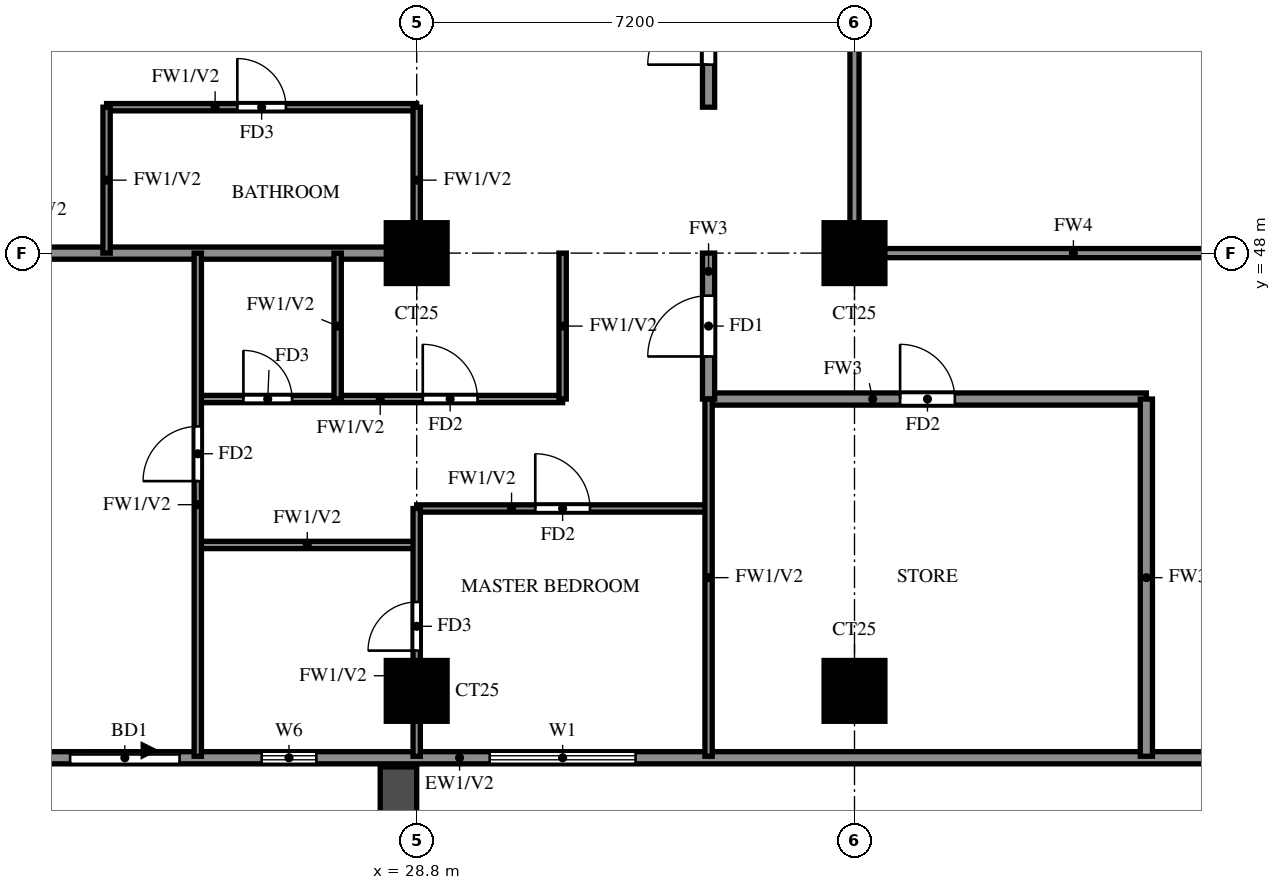
"""IFC4 building model, lengths in metres.
Left out: names, types, materials, properties, quantities, classifications, styles, units other than length and angle.
Written with IfcOpenShell. Run it as: python <this file> out.ifc"""

import sys

from ifc_helpers import new_model, si_unit, direction, frame, frame_2d, origin, origin_2d, place, context, subcontext, project, spatial, rectangle, extrude, source, transform, mapped, element, fill, save


model = new_model("IFC4")
c1 = context("Model", 3, precision=1e-05, world=origin(), true_north=direction((0.0, 1.0)))
c2 = subcontext(c1, "Body", "Model", "MODEL_VIEW")
j1 = project(units=[si_unit("LENGTHUNIT", "METRE"), si_unit("PLANEANGLEUNIT", "RADIAN")], contexts=[c1])
p1 = place(None, origin())
s1 = spatial("IfcSite", under=j1, at=p1, CompositionType="ELEMENT")
p2 = place(p1, origin())
s2 = spatial("IfcBuilding", under=s1, at=p2, CompositionType="ELEMENT")
p3 = place(p2, frame((0.0, 0.0, 160.5)))
s3 = spatial("IfcBuildingStorey", under=s2, at=p3, CompositionType="ELEMENT", Elevation=160.5)
m1 = source(origin(), c2, "Body", "SweptSolid", [
    extrude(rectangle(XDim=1.0, YDim=1.0, at=origin_2d()), origin(), (0.0, 0.0, 1.0), 3.2),
])
for number, where, z_axis, x_axis in (
    (1, (28.8, 40.8, 0.0), (0.0, 0.0, 1.0), (1.0, 0.0, 0.0)),
    (2, (36.0, 40.8, 0.0), (0.0, 0.0, 1.0), (1.0, 0.0, 0.0)),
    (3, (28.8, 48.0, 0.0), (0.0, 0.0, 1.0), (1.0, 0.0, 0.0)),
    (4, (36.0, 48.0, 0.0), (0.0, 0.0, 1.0), (1.0, 0.0, 0.0)),
):
    element("IfcColumn", number, at=place(p3, frame(where, z_axis=z_axis, x_axis=x_axis)), inside=s3, PredefinedType="COLUMN", context=c2, shape_type="MappedRepresentation", body=[
        mapped(m1, transform((0.0, 0.0, 0.0))),
    ])
p4 = place(p3, frame((18.2, 39.7, 0.0), z_axis=(0.0, 0.0, 1.0), x_axis=(1.0, 0.0, 0.0)))
e5 = element("IfcWall", 5, at=p4, inside=s3, PredefinedType="SOLIDWALL", context=c2, shape_type="SweptSolid", body=[
    extrude(rectangle(XDim=23.8, YDim=0.2, at=frame_2d((11.9, 0.0))), origin(), (0.0, 0.0, 1.0), 3.2),
])
p5 = place(p4, frame((4.9, 0.0, 0.0)))
e6 = element("IfcOpeningElement", 6, at=p5, cuts=e5, PredefinedType="OPENING", context=c2, shape_type="SweptSolid", body=[
    extrude(rectangle(XDim=1.8, YDim=2.4, at=frame_2d((0.9, 1.2))), frame((0.0, 0.11, 0.0), z_axis=(0.0, -1.0, 0.0), x_axis=(1.0, 0.0, 0.0)), (0.0, 0.0, 1.0), 0.22),
])
p6 = place(p4, frame((0.6, 0.0, 0.6)))
e7 = element("IfcOpeningElement", 7, at=p6, cuts=e5, PredefinedType="OPENING", context=c2, shape_type="SweptSolid", body=[
    extrude(rectangle(XDim=2.4, YDim=2.4, at=frame_2d((1.2, 1.2))), frame((0.0, 0.11, 0.0), z_axis=(0.0, -1.0, 0.0), x_axis=(1.0, 0.0, 0.0)), (0.0, 0.0, 1.0), 0.22),
])
p7 = place(p4, frame((11.8, 0.0, 0.6)))
e8 = element("IfcOpeningElement", 8, at=p7, cuts=e5, PredefinedType="OPENING", context=c2, shape_type="SweptSolid", body=[
    extrude(rectangle(XDim=2.4, YDim=2.4, at=frame_2d((1.2, 1.2))), frame((0.0, 0.11, 0.0), z_axis=(0.0, -1.0, 0.0), x_axis=(1.0, 0.0, 0.0)), (0.0, 0.0, 1.0), 0.22),
])
p8 = place(p4, frame((8.05, 0.0, 1.5)))
e9 = element("IfcOpeningElement", 9, at=p8, cuts=e5, PredefinedType="OPENING", context=c2, shape_type="SweptSolid", body=[
    extrude(rectangle(XDim=0.9, YDim=0.9, at=frame_2d((0.45, 0.45))), frame((0.0, 0.11, 0.0), z_axis=(0.0, -1.0, 0.0), x_axis=(1.0, 0.0, 0.0)), (0.0, 0.0, 1.0), 0.22),
])
p9 = place(p3, frame((28.5, 39.55, 0.0), z_axis=(0.0, 0.0, 1.0), x_axis=(0.0, -1.0, 0.0)))
e10 = element("IfcWall", 10, at=p9, inside=s3, PredefinedType="SOLIDWALL", context=c2, shape_type="SweptSolid", body=[
    extrude(rectangle(XDim=2.65, YDim=0.6, at=frame_2d((1.325, 0.0))), origin(), (0.0, 0.0, 1.0), 2.85),
])
p10 = place(p3, frame((33.6, 45.6, 0.0), z_axis=(0.0, 0.0, 1.0), x_axis=(1.0, 0.0, 0.0)))
e11 = element("IfcWall", 11, at=p10, inside=s3, PredefinedType="SOLIDWALL", context=c2, shape_type="SweptSolid", body=[
    extrude(rectangle(XDim=7.2, YDim=0.2, at=frame_2d((3.6, 0.0))), origin(), (0.0, 0.0, 1.0), 3.2),
])
p11 = place(p10, frame((3.15, 0.0, 0.0)))
e12 = element("IfcOpeningElement", 12, at=p11, cuts=e11, PredefinedType="OPENING", context=c2, shape_type="SweptSolid", body=[
    extrude(rectangle(XDim=0.9, YDim=2.1, at=frame_2d((0.45, 1.05))), frame((0.0, 0.11, 0.0), z_axis=(0.0, -1.0, 0.0), x_axis=(1.0, 0.0, 0.0)), (0.0, 0.0, 1.0), 0.22),
])
p12 = place(p3, frame((33.6, 45.6, 0.0), z_axis=(0.0, 0.0, 1.0), x_axis=(0.0, 1.0, 0.0)))
e13 = element("IfcWall", 13, at=p12, inside=s3, PredefinedType="SOLIDWALL", context=c2, shape_type="SweptSolid", body=[
    extrude(rectangle(XDim=2.4, YDim=0.2, at=frame_2d((1.2, 0.0))), origin(), (0.0, 0.0, 1.0), 3.2),
])
p13 = place(p12, frame((0.7, 0.0, 0.0)))
e14 = element("IfcOpeningElement", 14, at=p13, cuts=e13, PredefinedType="OPENING", context=c2, shape_type="SweptSolid", body=[
    extrude(rectangle(XDim=1.0, YDim=2.1, at=frame_2d((0.5, 1.05))), frame((0.0, 0.11, 0.0), z_axis=(0.0, -1.0, 0.0), x_axis=(1.0, 0.0, 0.0)), (0.0, 0.0, 1.0), 0.22),
])
p14 = place(p3, frame((33.6, 50.4, 0.0), z_axis=(0.0, 0.0, 1.0), x_axis=(0.0, 1.0, 0.0)))
e15 = element("IfcWall", 15, at=p14, inside=s3, PredefinedType="SOLIDWALL", context=c2, shape_type="SweptSolid", body=[
    extrude(rectangle(XDim=12.0, YDim=0.2, at=frame_2d((6.0, 0.0))), origin(), (0.0, 0.0, 1.0), 3.2),
])
p15 = place(p14, frame((0.7, 0.0, 0.0)))
e16 = element("IfcOpeningElement", 16, at=p15, cuts=e15, PredefinedType="OPENING", context=c2, shape_type="SweptSolid", body=[
    extrude(rectangle(XDim=1.0, YDim=2.1, at=frame_2d((0.5, 1.05))), frame((0.0, 0.11, 0.0), z_axis=(0.0, -1.0, 0.0), x_axis=(1.0, 0.0, 0.0)), (0.0, 0.0, 1.0), 0.22),
])
p16 = place(p14, frame((9.7, 0.0, 0.0)))
e17 = element("IfcOpeningElement", 17, at=p16, cuts=e15, PredefinedType="OPENING", context=c2, shape_type="SweptSolid", body=[
    extrude(rectangle(XDim=1.0, YDim=2.1, at=frame_2d((0.5, 1.05))), frame((0.0, 0.11, 0.0), z_axis=(0.0, -1.0, 0.0), x_axis=(1.0, 0.0, 0.0)), (0.0, 0.0, 1.0), 0.22),
])
p17 = place(p3, frame((40.8, 39.725, 0.0), z_axis=(0.0, 0.0, 1.0), x_axis=(0.0, 1.0, 0.0)))
e18 = element("IfcWall", 18, at=p17, inside=s3, PredefinedType="SOLIDWALL", context=c2, shape_type="SweptSolid", body=[
    extrude(rectangle(XDim=5.875, YDim=0.2, at=frame_2d((2.938, 0.0))), origin(), (0.0, 0.0, 1.0), 3.2),
])
p18 = place(p3, frame((14.525, 48.0, 0.0), z_axis=(0.0, 0.0, 1.0), x_axis=(1.0, 0.0, 0.0)))
e19 = element("IfcWall", 19, at=p18, inside=s3, PredefinedType="SOLIDWALL", context=c2, shape_type="SweptSolid", body=[
    extrude(rectangle(XDim=14.275, YDim=0.2, at=frame_2d((7.138, 0.0))), origin(), (0.0, 0.0, 1.0), 3.2),
])
p19 = place(p3, frame((25.2, 43.2, 0.0), z_axis=(0.0, 0.0, 1.0), x_axis=(1.0, 0.0, 0.0)))
e20 = element("IfcWall", 20, at=p19, inside=s3, PredefinedType="PARTITIONING", context=c2, shape_type="SweptSolid", body=[
    extrude(rectangle(XDim=3.6, YDim=0.12, at=frame_2d((1.8, 0.0))), origin(), (0.0, 0.0, 1.0), 3.2),
])
p20 = place(p3, frame((28.8, 43.8, 0.0), z_axis=(0.0, 0.0, 1.0), x_axis=(1.0, 0.0, 0.0)))
e21 = element("IfcWall", 21, at=p20, inside=s3, PredefinedType="PARTITIONING", context=c2, shape_type="SweptSolid", body=[
    extrude(rectangle(XDim=4.8, YDim=0.12, at=frame_2d((2.4, 0.0))), origin(), (0.0, 0.0, 1.0), 3.2),
])
p21 = place(p20, frame((1.95, 0.0, 0.0)))
e22 = element("IfcOpeningElement", 22, at=p21, cuts=e21, PredefinedType="OPENING", context=c2, shape_type="SweptSolid", body=[
    extrude(rectangle(XDim=0.9, YDim=2.1, at=frame_2d((0.45, 1.05))), frame((0.0, 0.07, 0.0), z_axis=(0.0, -1.0, 0.0), x_axis=(1.0, 0.0, 0.0)), (0.0, 0.0, 1.0), 0.14),
])
p22 = place(p3, frame((25.2, 45.6, 0.0), z_axis=(0.0, 0.0, 1.0), x_axis=(1.0, 0.0, 0.0)))
e23 = element("IfcWall", 23, at=p22, inside=s3, PredefinedType="PARTITIONING", context=c2, shape_type="SweptSolid", body=[
    extrude(rectangle(XDim=6.0, YDim=0.12, at=frame_2d((3.0, 0.0))), origin(), (0.0, 0.0, 1.0), 3.2),
])
p23 = place(p22, frame((0.75, 0.0, 0.0)))
e24 = element("IfcOpeningElement", 24, at=p23, cuts=e23, PredefinedType="OPENING", context=c2, shape_type="SweptSolid", body=[
    extrude(rectangle(XDim=0.8, YDim=2.1, at=frame_2d((0.4, 1.05))), frame((0.0, 0.07, 0.0), z_axis=(0.0, -1.0, 0.0), x_axis=(1.0, 0.0, 0.0)), (0.0, 0.0, 1.0), 0.14),
])
p24 = place(p22, frame((3.7, 0.0, 0.0)))
e25 = element("IfcOpeningElement", 25, at=p24, cuts=e23, PredefinedType="OPENING", context=c2, shape_type="SweptSolid", body=[
    extrude(rectangle(XDim=0.9, YDim=2.1, at=frame_2d((0.45, 1.05))), frame((0.0, 0.07, 0.0), z_axis=(0.0, -1.0, 0.0), x_axis=(1.0, 0.0, 0.0)), (0.0, 0.0, 1.0), 0.14),
])
p25 = place(p3, frame((23.7, 50.4, 0.0), z_axis=(0.0, 0.0, 1.0), x_axis=(1.0, 0.0, 0.0)))
e26 = element("IfcWall", 26, at=p25, inside=s3, PredefinedType="PARTITIONING", context=c2, shape_type="SweptSolid", body=[
    extrude(rectangle(XDim=5.1, YDim=0.12, at=frame_2d((2.55, 0.0))), origin(), (0.0, 0.0, 1.0), 3.2),
])
p26 = place(p25, frame((2.15, 0.0, 0.0)))
e27 = element("IfcOpeningElement", 27, at=p26, cuts=e26, PredefinedType="OPENING", context=c2, shape_type="SweptSolid", body=[
    extrude(rectangle(XDim=0.8, YDim=2.1, at=frame_2d((0.4, 1.05))), frame((0.0, 0.07, 0.0), z_axis=(0.0, -1.0, 0.0), x_axis=(1.0, 0.0, 0.0)), (0.0, 0.0, 1.0), 0.14),
])
p27 = place(p3, frame((23.7, 48.0, 0.0), z_axis=(0.0, 0.0, 1.0), x_axis=(0.0, 1.0, 0.0)))
e28 = element("IfcWall", 28, at=p27, inside=s3, PredefinedType="PARTITIONING", context=c2, shape_type="SweptSolid", body=[
    extrude(rectangle(XDim=2.4, YDim=0.12, at=frame_2d((1.2, 0.0))), origin(), (0.0, 0.0, 1.0), 3.2),
])
p28 = place(p3, frame((25.2, 39.725, 0.0), z_axis=(0.0, 0.0, 1.0), x_axis=(0.0, 1.0, 0.0)))
e29 = element("IfcWall", 29, at=p28, inside=s3, PredefinedType="PARTITIONING", context=c2, shape_type="SweptSolid", body=[
    extrude(rectangle(XDim=8.275, YDim=0.12, at=frame_2d((4.137, 0.0))), origin(), (0.0, 0.0, 1.0), 3.2),
])
p29 = place(p28, frame((4.525, 0.0, 0.0)))
e30 = element("IfcOpeningElement", 30, at=p29, cuts=e29, PredefinedType="OPENING", context=c2, shape_type="SweptSolid", body=[
    extrude(rectangle(XDim=0.9, YDim=2.1, at=frame_2d((0.45, 1.05))), frame((0.0, 0.07, 0.0), z_axis=(0.0, -1.0, 0.0), x_axis=(1.0, 0.0, 0.0)), (0.0, 0.0, 1.0), 0.14),
])
p30 = place(p3, frame((27.5, 45.6, 0.0), z_axis=(0.0, 0.0, 1.0), x_axis=(0.0, 1.0, 0.0)))
e31 = element("IfcWall", 31, at=p30, inside=s3, PredefinedType="PARTITIONING", context=c2, shape_type="SweptSolid", body=[
    extrude(rectangle(XDim=2.4, YDim=0.12, at=frame_2d((1.2, 0.0))), origin(), (0.0, 0.0, 1.0), 3.2),
])
p31 = place(p3, frame((28.8, 39.725, 0.0), z_axis=(0.0, 0.0, 1.0), x_axis=(0.0, 1.0, 0.0)))
e32 = element("IfcWall", 32, at=p31, inside=s3, PredefinedType="PARTITIONING", context=c2, shape_type="SweptSolid", body=[
    extrude(rectangle(XDim=4.075, YDim=0.12, at=frame_2d((2.038, 0.0))), origin(), (0.0, 0.0, 1.0), 3.2),
])
p32 = place(p31, frame((1.738, 0.0, 0.0)))
e33 = element("IfcOpeningElement", 33, at=p32, cuts=e32, PredefinedType="OPENING", context=c2, shape_type="SweptSolid", body=[
    extrude(rectangle(XDim=0.8, YDim=2.1, at=frame_2d((0.4, 1.05))), frame((0.0, 0.07, 0.0), z_axis=(0.0, -1.0, 0.0), x_axis=(1.0, 0.0, 0.0)), (0.0, 0.0, 1.0), 0.14),
])
for number, where, z_axis, x_axis in (
    (34, (28.8, 48.0, 0.0), (0.0, 0.0, 1.0), (0.0, 1.0, 0.0)),
    (35, (31.2, 45.6, 0.0), (0.0, 0.0, 1.0), (0.0, 1.0, 0.0)),
):
    element("IfcWall", number, at=place(p3, frame(where, z_axis=z_axis, x_axis=x_axis)), inside=s3, PredefinedType="PARTITIONING", context=c2, shape_type="SweptSolid", body=[
        extrude(rectangle(XDim=2.4, YDim=0.12, at=frame_2d((1.2, 0.0))), origin(), (0.0, 0.0, 1.0), 3.2),
    ])
p33 = place(p3, frame((33.6, 39.725, 0.0), z_axis=(0.0, 0.0, 1.0), x_axis=(0.0, 1.0, 0.0)))
e36 = element("IfcWall", 36, at=p33, inside=s3, PredefinedType="PARTITIONING", context=c2, shape_type="SweptSolid", body=[
    extrude(rectangle(XDim=5.875, YDim=0.12, at=frame_2d((2.938, 0.0))), origin(), (0.0, 0.0, 1.0), 3.2),
])
p34 = place(p3, frame((36.0, 48.0, 0.0), z_axis=(0.0, 0.0, 1.0), x_axis=(1.0, 0.0, 0.0)))
e37 = element("IfcWall", 37, at=p34, inside=s3, PredefinedType="SOLIDWALL", context=c2, shape_type="SweptSolid", body=[
    extrude(rectangle(XDim=7.2, YDim=0.15, at=frame_2d((3.6, 0.0))), origin(), (0.0, 0.0, 1.0), 2.3),
])
p35 = place(p3, frame((36.0, 48.0, 0.0), z_axis=(0.0, 0.0, 1.0), x_axis=(0.0, 1.0, 0.0)))
e38 = element("IfcWall", 38, at=p35, inside=s3, PredefinedType="SOLIDWALL", context=c2, shape_type="SweptSolid", body=[
    extrude(rectangle(XDim=14.4, YDim=0.15, at=frame_2d((7.2, 0.0))), origin(), (0.0, 0.0, 1.0), 2.3),
])
p36 = place(p5, origin())
e39 = element("IfcDoor", 39, at=p36, inside=s3, OperationType="DOUBLE_DOOR_SLIDING", PredefinedType="DOOR", context=c2, shape_type="SweptSolid", body=[
    extrude(rectangle(XDim=1.8, YDim=2.4, at=frame_2d((0.9, 1.2))), frame((0.0, 0.025, 0.0), z_axis=(0.0, -1.0, 0.0), x_axis=(1.0, 0.0, 0.0)), (0.0, 0.0, 1.0), 0.05),
])
fill(e6, e39)
p37 = place(p7, origin())
e40 = element("IfcWindow", 40, at=p37, inside=s3, PartitioningType="DOUBLE_PANEL_VERTICAL", PredefinedType="WINDOW", context=c2, shape_type="SweptSolid", body=[
    extrude(rectangle(XDim=2.4, YDim=2.4, at=frame_2d((1.2, 1.2))), frame((0.0, 0.03, 0.0), z_axis=(0.0, -1.0, 0.0), x_axis=(1.0, 0.0, 0.0)), (0.0, 0.0, 1.0), 0.06),
])
fill(e8, e40)
p38 = place(p8, origin())
e41 = element("IfcWindow", 41, at=p38, inside=s3, PartitioningType="SINGLE_PANEL", PredefinedType="WINDOW", context=c2, shape_type="SweptSolid", body=[
    extrude(rectangle(XDim=0.9, YDim=0.9, at=frame_2d((0.45, 0.45))), frame((0.0, 0.03, 0.0), z_axis=(0.0, -1.0, 0.0), x_axis=(1.0, 0.0, 0.0)), (0.0, 0.0, 1.0), 0.06),
])
fill(e9, e41)
p39 = place(p13, origin())
e42 = element("IfcDoor", 42, at=p39, inside=s3, OperationType="SINGLE_SWING_RIGHT", PredefinedType="DOOR", context=c2, shape_type="SweptSolid", body=[
    extrude(rectangle(XDim=1.0, YDim=2.1, at=frame_2d((0.5, 1.05))), frame((0.0, 0.025, 0.0), z_axis=(0.0, -1.0, 0.0), x_axis=(1.0, 0.0, 0.0)), (0.0, 0.0, 1.0), 0.05),
])
fill(e14, e42)
p40 = place(p29, origin())
e43 = element("IfcDoor", 43, at=p40, inside=s3, OperationType="SINGLE_SWING_LEFT", PredefinedType="DOOR", context=c2, shape_type="SweptSolid", body=[
    extrude(rectangle(XDim=0.9, YDim=2.1, at=frame_2d((0.45, 1.05))), frame((0.0, 0.025, 0.0), z_axis=(0.0, -1.0, 0.0), x_axis=(1.0, 0.0, 0.0)), (0.0, 0.0, 1.0), 0.05),
])
fill(e30, e43)
p41 = place(p21, origin())
e44 = element("IfcDoor", 44, at=p41, inside=s3, OperationType="SINGLE_SWING_LEFT", PredefinedType="DOOR", context=c2, shape_type="SweptSolid", body=[
    extrude(rectangle(XDim=0.9, YDim=2.1, at=frame_2d((0.45, 1.05))), frame((0.0, 0.025, 0.0), z_axis=(0.0, -1.0, 0.0), x_axis=(1.0, 0.0, 0.0)), (0.0, 0.0, 1.0), 0.05),
])
fill(e22, e44)
p42 = place(p32, origin())
e45 = element("IfcDoor", 45, at=p42, inside=s3, OperationType="SINGLE_SWING_LEFT", PredefinedType="DOOR", context=c2, shape_type="SweptSolid", body=[
    extrude(rectangle(XDim=0.8, YDim=2.1, at=frame_2d((0.4, 1.05))), frame((0.0, 0.025, 0.0), z_axis=(0.0, -1.0, 0.0), x_axis=(1.0, 0.0, 0.0)), (0.0, 0.0, 1.0), 0.05),
])
fill(e33, e45)
p43 = place(p23, origin())
e46 = element("IfcDoor", 46, at=p43, inside=s3, OperationType="SINGLE_SWING_LEFT", PredefinedType="DOOR", context=c2, shape_type="SweptSolid", body=[
    extrude(rectangle(XDim=0.8, YDim=2.1, at=frame_2d((0.4, 1.05))), frame((0.0, 0.025, 0.0), z_axis=(0.0, -1.0, 0.0), x_axis=(1.0, 0.0, 0.0)), (0.0, 0.0, 1.0), 0.05),
])
fill(e24, e46)
p44 = place(p24, origin())
e47 = element("IfcDoor", 47, at=p44, inside=s3, OperationType="SINGLE_SWING_LEFT", PredefinedType="DOOR", context=c2, shape_type="SweptSolid", body=[
    extrude(rectangle(XDim=0.9, YDim=2.1, at=frame_2d((0.45, 1.05))), frame((0.0, 0.025, 0.0), z_axis=(0.0, -1.0, 0.0), x_axis=(1.0, 0.0, 0.0)), (0.0, 0.0, 1.0), 0.05),
])
fill(e25, e47)
p45 = place(p11, origin())
e48 = element("IfcDoor", 48, at=p45, inside=s3, OperationType="SINGLE_SWING_RIGHT", PredefinedType="DOOR", context=c2, shape_type="SweptSolid", body=[
    extrude(rectangle(XDim=0.9, YDim=2.1, at=frame_2d((0.45, 1.05))), frame((0.0, 0.025, 0.0), z_axis=(0.0, -1.0, 0.0), x_axis=(1.0, 0.0, 0.0)), (0.0, 0.0, 1.0), 0.05),
])
fill(e12, e48)
p46 = place(p15, origin())
e49 = element("IfcDoor", 49, at=p46, inside=s3, OperationType="SINGLE_SWING_LEFT", PredefinedType="DOOR", context=c2, shape_type="SweptSolid", body=[
    extrude(rectangle(XDim=1.0, YDim=2.1, at=frame_2d((0.5, 1.05))), frame((0.0, 0.025, 0.0), z_axis=(0.0, -1.0, 0.0), x_axis=(1.0, 0.0, 0.0)), (0.0, 0.0, 1.0), 0.05),
])
fill(e16, e49)
p47 = place(p26, origin())
e50 = element("IfcDoor", 50, at=p47, inside=s3, OperationType="SINGLE_SWING_LEFT", PredefinedType="DOOR", context=c2, shape_type="SweptSolid", body=[
    extrude(rectangle(XDim=0.8, YDim=2.1, at=frame_2d((0.4, 1.05))), frame((0.0, 0.025, 0.0), z_axis=(0.0, -1.0, 0.0), x_axis=(1.0, 0.0, 0.0)), (0.0, 0.0, 1.0), 0.05),
])
fill(e27, e50)
save(model, sys.argv[1])
